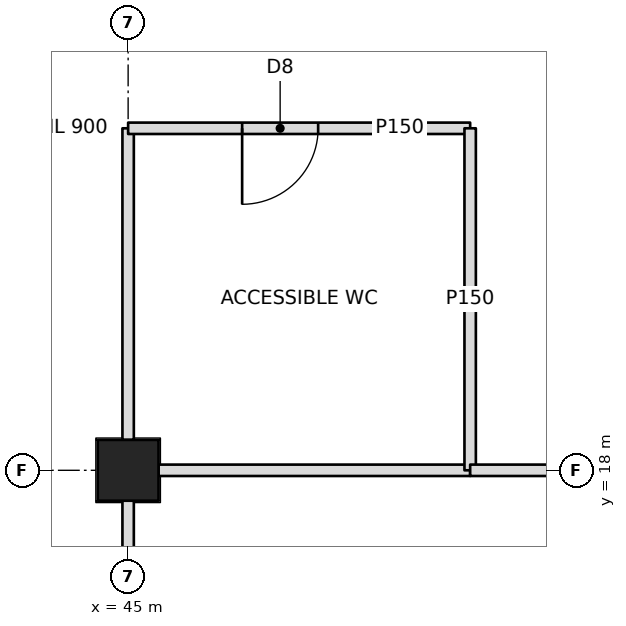
"""IFC4 building model, lengths in metres.
Left out: names, types, materials, properties, quantities, classifications, styles, units other than length and angle.
Written with IfcOpenShell. Run it as: python <this file> out.ifc"""

import sys

from ifc_helpers import new_model, si_unit, direction, frame, frame_2d, origin, origin_2d, place, context, subcontext, project, spatial, rectangle, hollow_rectangle, extrude, element, fill, save


model = new_model("IFC4")
c1 = context("Model", 3, precision=1e-05, world=origin(), true_north=direction((0.0, 1.0)))
c2 = subcontext(c1, "Body", "Model", "MODEL_VIEW")
j1 = project(units=[si_unit("LENGTHUNIT", "METRE"), si_unit("PLANEANGLEUNIT", "RADIAN")], contexts=[c1])
p1 = place(None, origin())
s1 = spatial("IfcSite", under=j1, at=p1, CompositionType="ELEMENT")
p2 = place(p1, origin())
s2 = spatial("IfcBuilding", under=s1, at=p2, CompositionType="ELEMENT")
p3 = place(p2, frame((0.0, 0.0, -5.5)))
s3 = spatial("IfcBuildingStorey", under=s2, at=p3, CompositionType="ELEMENT", Elevation=-5.5)
p4 = place(p3, frame((45.0, 18.0, 0.0), z_axis=(0.0, 0.0, 1.0), x_axis=(0.0, 1.0, 0.0)))
e1 = element("IfcColumn", 1, at=p4, inside=s3, PredefinedType="COLUMN", context=c2, shape_type="SweptSolid", body=[
    extrude(hollow_rectangle(XDim=0.8, YDim=0.8, WallThickness=0.1, at=origin_2d()), origin(), (0.0, 0.0, 1.0), 5.5),
])
p5 = place(p3, frame((45.0, 9.4, 0.0), z_axis=(0.0, 0.0, 1.0), x_axis=(0.0, 1.0, 0.0)))
e2 = element("IfcWall", 2, at=p5, inside=s3, PredefinedType="PARTITIONING", context=c2, shape_type="SweptSolid", body=[
    extrude(rectangle(XDim=8.2, YDim=0.15, at=frame_2d((4.1, 0.0))), origin(), (0.0, 0.0, 1.0), 4.253),
])
for number, where, z_axis, x_axis in (
    (3, (45.4, 18.0, 0.0), (0.0, 0.0, 1.0), (1.0, 0.0, 0.0)),
    (4, (45.0, 18.4, 0.0), (0.0, 0.0, 1.0), (0.0, 1.0, 0.0)),
):
    element("IfcWall", number, at=place(p3, frame(where, z_axis=z_axis, x_axis=x_axis)), inside=s3, PredefinedType="PARTITIONING", context=c2, shape_type="SweptSolid", body=[
        extrude(rectangle(XDim=4.1, YDim=0.15, at=frame_2d((2.05, 0.0))), origin(), (0.0, 0.0, 1.0), 4.253),
    ])
p6 = place(p3, frame((45.0, 22.5, 0.0), z_axis=(0.0, 0.0, 1.0), x_axis=(1.0, 0.0, 0.0)))
e5 = element("IfcWall", 5, at=p6, inside=s3, PredefinedType="PARTITIONING", context=c2, shape_type="SweptSolid", body=[
    extrude(rectangle(XDim=4.5, YDim=0.15, at=frame_2d((2.25, 0.0))), origin(), (0.0, 0.0, 1.0), 4.252),
])
p7 = place(p6, frame((1.5, 0.0, 0.0)))
e6 = element("IfcOpeningElement", 6, at=p7, cuts=e5, PredefinedType="OPENING", context=c2, shape_type="SweptSolid", body=[
    extrude(rectangle(XDim=1.0, YDim=2.1, at=frame_2d((0.5, 1.05))), frame((0.0, 0.085, 0.0), z_axis=(0.0, -1.0, 0.0), x_axis=(1.0, 0.0, 0.0)), (0.0, 0.0, 1.0), 0.17),
])
p8 = place(p3, frame((49.5, 22.5, 0.0), z_axis=(0.0, 0.0, 1.0), x_axis=(0.0, -1.0, 0.0)))
e7 = element("IfcWall", 7, at=p8, inside=s3, PredefinedType="PARTITIONING", context=c2, shape_type="SweptSolid", body=[
    extrude(rectangle(XDim=4.5, YDim=0.15, at=frame_2d((2.25, 0.0))), origin(), (0.0, 0.0, 1.0), 4.252),
])
p9 = place(p3, frame((49.5, 18.0, 0.0), z_axis=(0.0, 0.0, 1.0), x_axis=(1.0, 0.0, 0.0)))
e8 = element("IfcWall", 8, at=p9, inside=s3, PredefinedType="PARTITIONING", context=c2, shape_type="SweptSolid", body=[
    extrude(rectangle(XDim=4.1, YDim=0.15, at=frame_2d((2.05, 0.0))), origin(), (0.0, 0.0, 1.0), 4.253),
])
p10 = place(p7, frame((1.0, 0.0, 0.0), z_axis=(0.0, 0.0, 1.0), x_axis=(-1.0, 0.0, 0.0)))
e9 = element("IfcDoor", 9, at=p10, inside=s3, OperationType="SINGLE_SWING_RIGHT", PredefinedType="DOOR", context=c2, shape_type="SweptSolid", body=[
    extrude(rectangle(XDim=1.0, YDim=2.1, at=frame_2d((0.5, 1.05))), frame((0.0, 0.025, 0.0), z_axis=(0.0, -1.0, 0.0), x_axis=(1.0, 0.0, 0.0)), (0.0, 0.0, 1.0), 0.05),
])
fill(e6, e9)
save(model, sys.argv[1])
